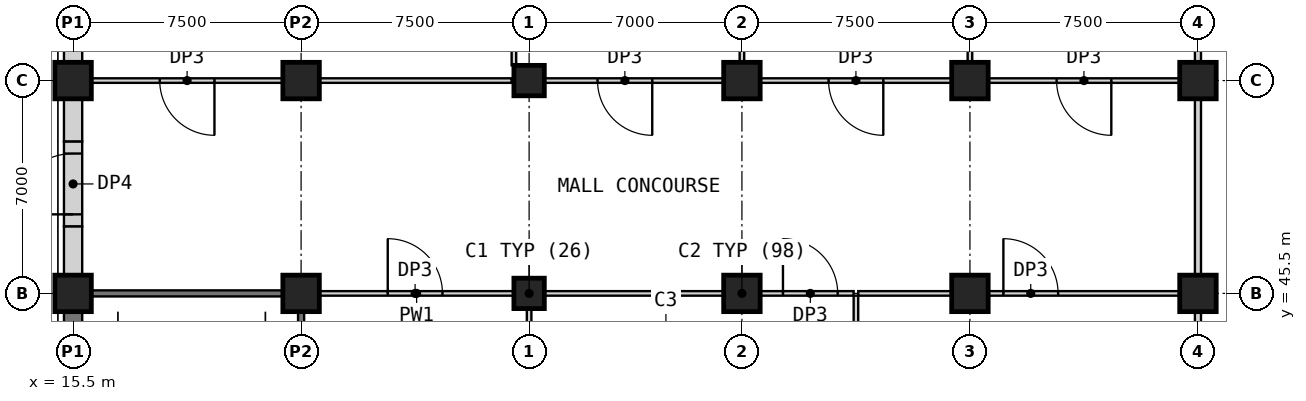
"""IFC4 building model, lengths in metres.
Left out: names, types, materials, properties, quantities, classifications, styles, units other than length and angle.
Written with IfcOpenShell. Run it as: python <this file> out.ifc"""

import sys

from ifc_helpers import new_model, si_unit, direction, frame, frame_2d, origin, origin_2d, place, context, subcontext, project, spatial, rectangle, extrude, element, fill, save


model = new_model("IFC4")
c1 = context("Model", 3, precision=1e-05, world=origin(), true_north=direction((0.0, 1.0)))
c2 = subcontext(c1, "Body", "Model", "MODEL_VIEW")
j1 = project(units=[si_unit("LENGTHUNIT", "METRE"), si_unit("PLANEANGLEUNIT", "RADIAN")], contexts=[c1])
p1 = place(None, origin())
s1 = spatial("IfcSite", under=j1, at=p1, CompositionType="ELEMENT")
p2 = place(p1, origin())
s2 = spatial("IfcBuilding", under=s1, at=p2, CompositionType="ELEMENT")
p3 = place(p2, origin())
s3 = spatial("IfcBuildingStorey", under=s2, at=p3, CompositionType="ELEMENT", Elevation=0.0)
for number, where, z_axis, x_axis in (
    (1, (30.5, 45.5, 0.0), (0.0, 0.0, 1.0), (1.0, 0.0, 0.0)),
    (2, (30.5, 52.5, 0.0), (0.0, 0.0, 1.0), (1.0, 0.0, 0.0)),
):
    element("IfcColumn", number, at=place(p3, frame(where, z_axis=z_axis, x_axis=x_axis)), inside=s3, PredefinedType="COLUMN", context=c2, shape_type="SweptSolid", body=[
        extrude(rectangle(XDim=1.0, YDim=1.0, at=origin_2d()), origin(), (0.0, 0.0, 1.0), 8.0),
    ])
for number, where, z_axis, x_axis in (
    (3, (37.5, 45.5, 0.0), (0.0, 0.0, 1.0), (1.0, 0.0, 0.0)),
    (4, (37.5, 52.5, 0.0), (0.0, 0.0, 1.0), (1.0, 0.0, 0.0)),
    (5, (45.0, 45.5, 0.0), (0.0, 0.0, 1.0), (1.0, 0.0, 0.0)),
    (6, (45.0, 52.5, 0.0), (0.0, 0.0, 1.0), (1.0, 0.0, 0.0)),
    (7, (52.5, 45.5, 0.0), (0.0, 0.0, 1.0), (1.0, 0.0, 0.0)),
    (8, (52.5, 52.5, 0.0), (0.0, 0.0, 1.0), (1.0, 0.0, 0.0)),
    (9, (15.5, 45.5, 0.0), (0.0, 0.0, 1.0), (1.0, 0.0, 0.0)),
    (10, (15.5, 52.5, 0.0), (0.0, 0.0, 1.0), (1.0, 0.0, 0.0)),
    (11, (23.0, 45.5, 0.0), (0.0, 0.0, 1.0), (1.0, 0.0, 0.0)),
    (12, (23.0, 52.5, 0.0), (0.0, 0.0, 1.0), (1.0, 0.0, 0.0)),
):
    element("IfcColumn", number, at=place(p3, frame(where, z_axis=z_axis, x_axis=x_axis)), inside=s3, PredefinedType="COLUMN", context=c2, shape_type="SweptSolid", body=[
        extrude(rectangle(XDim=1.2, YDim=1.2, at=origin_2d()), origin(), (0.0, 0.0, 1.0), 8.0),
    ])
p4 = place(p3, frame((16.1, 45.5, 0.0), z_axis=(0.0, 0.0, 1.0), x_axis=(1.0, 0.0, 0.0)))
e13 = element("IfcWall", 13, at=p4, inside=s3, PredefinedType="SHEAR", context=c2, shape_type="SweptSolid", body=[
    extrude(rectangle(XDim=6.3, YDim=0.2, at=frame_2d((3.15, 0.0))), origin(), (0.0, 0.0, 1.0), 7.7),
])
p5 = place(p3, frame((23.6, 45.5, 0.0), z_axis=(0.0, 0.0, 1.0), x_axis=(1.0, 0.0, 0.0)))
e14 = element("IfcWall", 14, at=p5, inside=s3, PredefinedType="PARTITIONING", context=c2, shape_type="SweptSolid", body=[
    extrude(rectangle(XDim=6.4, YDim=0.15, at=frame_2d((3.2, 0.0))), origin(), (0.0, 0.0, 1.0), 7.7),
])
p6 = place(p5, frame((2.25, 0.0, 0.0)))
e15 = element("IfcOpeningElement", 15, at=p6, cuts=e14, PredefinedType="OPENING", context=c2, shape_type="SweptSolid", body=[
    extrude(rectangle(XDim=1.8, YDim=2.4, at=frame_2d((0.9, 1.2))), frame((0.0, 0.085, 0.0), z_axis=(0.0, -1.0, 0.0), x_axis=(1.0, 0.0, 0.0)), (0.0, 0.0, 1.0), 0.17),
])
p7 = place(p3, frame((31.0, 45.5, 0.0), z_axis=(0.0, 0.0, 1.0), x_axis=(1.0, 0.0, 0.0)))
e16 = element("IfcWall", 16, at=p7, inside=s3, PredefinedType="PARTITIONING", context=c2, shape_type="SweptSolid", body=[
    extrude(rectangle(XDim=5.9, YDim=0.15, at=frame_2d((2.95, 0.0))), origin(), (0.0, 0.0, 1.0), 7.7),
])
p8 = place(p3, frame((38.1, 45.5, 0.0), z_axis=(0.0, 0.0, 1.0), x_axis=(1.0, 0.0, 0.0)))
e17 = element("IfcWall", 17, at=p8, inside=s3, PredefinedType="PARTITIONING", context=c2, shape_type="SweptSolid", body=[
    extrude(rectangle(XDim=3.075, YDim=0.15, at=frame_2d((1.538, 0.0))), origin(), (0.0, 0.0, 1.0), 7.7),
])
p9 = place(p8, frame((0.75, 0.0, 0.0)))
e18 = element("IfcOpeningElement", 18, at=p9, cuts=e17, PredefinedType="OPENING", context=c2, shape_type="SweptSolid", body=[
    extrude(rectangle(XDim=1.8, YDim=2.4, at=frame_2d((0.9, 1.2))), frame((0.0, 0.085, 0.0), z_axis=(0.0, -1.0, 0.0), x_axis=(1.0, 0.0, 0.0)), (0.0, 0.0, 1.0), 0.17),
])
p10 = place(p3, frame((41.325, 45.5, 0.0), z_axis=(0.0, 0.0, 1.0), x_axis=(1.0, 0.0, 0.0)))
e19 = element("IfcWall", 19, at=p10, inside=s3, PredefinedType="PARTITIONING", context=c2, shape_type="SweptSolid", body=[
    extrude(rectangle(XDim=3.075, YDim=0.15, at=frame_2d((1.538, 0.0))), origin(), (0.0, 0.0, 1.0), 7.7),
])
p11 = place(p3, frame((45.6, 45.5, 0.0), z_axis=(0.0, 0.0, 1.0), x_axis=(1.0, 0.0, 0.0)))
e20 = element("IfcWall", 20, at=p11, inside=s3, PredefinedType="PARTITIONING", context=c2, shape_type="SweptSolid", body=[
    extrude(rectangle(XDim=6.3, YDim=0.15, at=frame_2d((3.15, 0.0))), origin(), (0.0, 0.0, 1.0), 7.7),
])
p12 = place(p11, frame((0.5, 0.0, 0.0)))
e21 = element("IfcOpeningElement", 21, at=p12, cuts=e20, PredefinedType="OPENING", context=c2, shape_type="SweptSolid", body=[
    extrude(rectangle(XDim=1.8, YDim=2.4, at=frame_2d((0.9, 1.2))), frame((0.0, 0.085, 0.0), z_axis=(0.0, -1.0, 0.0), x_axis=(1.0, 0.0, 0.0)), (0.0, 0.0, 1.0), 0.17),
])
p13 = place(p3, frame((22.4, 52.5, 0.0), z_axis=(0.0, 0.0, 1.0), x_axis=(-1.0, 0.0, 0.0)))
e22 = element("IfcWall", 22, at=p13, inside=s3, PredefinedType="PARTITIONING", context=c2, shape_type="SweptSolid", body=[
    extrude(rectangle(XDim=6.3, YDim=0.15, at=frame_2d((3.15, 0.0))), origin(), (0.0, 0.0, 1.0), 7.7),
])
p14 = place(p13, frame((2.25, 0.0, 0.0)))
e23 = element("IfcOpeningElement", 23, at=p14, cuts=e22, PredefinedType="OPENING", context=c2, shape_type="SweptSolid", body=[
    extrude(rectangle(XDim=1.8, YDim=2.4, at=frame_2d((0.9, 1.2))), frame((0.0, 0.085, 0.0), z_axis=(0.0, -1.0, 0.0), x_axis=(1.0, 0.0, 0.0)), (0.0, 0.0, 1.0), 0.17),
])
p15 = place(p3, frame((23.6, 52.5, 0.0), z_axis=(0.0, 0.0, 1.0), x_axis=(1.0, 0.0, 0.0)))
e24 = element("IfcWall", 24, at=p15, inside=s3, PredefinedType="PARTITIONING", context=c2, shape_type="SweptSolid", body=[
    extrude(rectangle(XDim=6.325, YDim=0.15, at=frame_2d((3.163, 0.0))), origin(), (0.0, 0.0, 1.0), 7.7),
])
p16 = place(p3, frame((36.9, 52.5, 0.0), z_axis=(0.0, 0.0, 1.0), x_axis=(-1.0, 0.0, 0.0)))
e25 = element("IfcWall", 25, at=p16, inside=s3, PredefinedType="PARTITIONING", context=c2, shape_type="SweptSolid", body=[
    extrude(rectangle(XDim=5.9, YDim=0.15, at=frame_2d((2.95, 0.0))), origin(), (0.0, 0.0, 1.0), 7.7),
])
p17 = place(p16, frame((2.35, 0.0, 0.0)))
e26 = element("IfcOpeningElement", 26, at=p17, cuts=e25, PredefinedType="OPENING", context=c2, shape_type="SweptSolid", body=[
    extrude(rectangle(XDim=1.8, YDim=2.4, at=frame_2d((0.9, 1.2))), frame((0.0, 0.085, 0.0), z_axis=(0.0, -1.0, 0.0), x_axis=(1.0, 0.0, 0.0)), (0.0, 0.0, 1.0), 0.17),
])
p18 = place(p3, frame((44.4, 52.5, 0.0), z_axis=(0.0, 0.0, 1.0), x_axis=(-1.0, 0.0, 0.0)))
e27 = element("IfcWall", 27, at=p18, inside=s3, PredefinedType="PARTITIONING", context=c2, shape_type="SweptSolid", body=[
    extrude(rectangle(XDim=6.3, YDim=0.15, at=frame_2d((3.15, 0.0))), origin(), (0.0, 0.0, 1.0), 7.7),
])
p19 = place(p18, frame((2.25, 0.0, 0.0)))
e28 = element("IfcOpeningElement", 28, at=p19, cuts=e27, PredefinedType="OPENING", context=c2, shape_type="SweptSolid", body=[
    extrude(rectangle(XDim=1.8, YDim=2.4, at=frame_2d((0.9, 1.2))), frame((0.0, 0.085, 0.0), z_axis=(0.0, -1.0, 0.0), x_axis=(1.0, 0.0, 0.0)), (0.0, 0.0, 1.0), 0.17),
])
p20 = place(p3, frame((51.9, 52.5, 0.0), z_axis=(0.0, 0.0, 1.0), x_axis=(-1.0, 0.0, 0.0)))
e29 = element("IfcWall", 29, at=p20, inside=s3, PredefinedType="PARTITIONING", context=c2, shape_type="SweptSolid", body=[
    extrude(rectangle(XDim=6.3, YDim=0.15, at=frame_2d((3.15, 0.0))), origin(), (0.0, 0.0, 1.0), 7.7),
])
p21 = place(p20, frame((2.25, 0.0, 0.0)))
e30 = element("IfcOpeningElement", 30, at=p21, cuts=e29, PredefinedType="OPENING", context=c2, shape_type="SweptSolid", body=[
    extrude(rectangle(XDim=1.8, YDim=2.4, at=frame_2d((0.9, 1.2))), frame((0.0, 0.085, 0.0), z_axis=(0.0, -1.0, 0.0), x_axis=(1.0, 0.0, 0.0)), (0.0, 0.0, 1.0), 0.17),
])
p22 = place(p3, frame((15.5, 43.9, 0.0), z_axis=(0.0, 0.0, 1.0), x_axis=(0.0, 1.0, 0.0)))
e31 = element("IfcWall", 31, at=p22, inside=s3, PredefinedType="PARTITIONING", context=c2, shape_type="SweptSolid", body=[
    extrude(rectangle(XDim=1.0, YDim=0.6, at=frame_2d((0.5, 0.0))), origin(), (0.0, 0.0, 1.0), 7.1),
])
p23 = place(p3, frame((15.5, 47.7, 0.0), z_axis=(0.0, 0.0, 1.0), x_axis=(0.0, 1.0, 0.0)))
e32 = element("IfcWall", 32, at=p23, inside=s3, PredefinedType="PARTITIONING", context=c2, shape_type="SweptSolid", body=[
    extrude(rectangle(XDim=2.8, YDim=0.6, at=frame_2d((1.4, 0.0))), origin(), (0.0, 0.0, 1.0), 7.1),
])
p24 = place(p23, frame((0.4, 0.0, 0.0)))
e33 = element("IfcOpeningElement", 33, at=p24, cuts=e32, PredefinedType="OPENING", context=c2, shape_type="SweptSolid", body=[
    extrude(rectangle(XDim=2.0, YDim=2.4, at=frame_2d((1.0, 1.2))), frame((0.0, 0.31, 0.0), z_axis=(0.0, -1.0, 0.0), x_axis=(1.0, 0.0, 0.0)), (0.0, 0.0, 1.0), 0.62),
])
p25 = place(p3, frame((15.5, 46.1, 0.0), z_axis=(0.0, 0.0, 1.0), x_axis=(0.0, 1.0, 0.0)))
e34 = element("IfcWall", 34, at=p25, inside=s3, PredefinedType="PARTITIONING", context=c2, shape_type="SweptSolid", body=[
    extrude(rectangle(XDim=1.6, YDim=0.6, at=frame_2d((0.8, 0.0))), origin(), (0.0, 0.0, 1.0), 7.1),
])
p26 = place(p3, frame((15.5, 50.5, 0.0), z_axis=(0.0, 0.0, 1.0), x_axis=(0.0, 1.0, 0.0)))
e35 = element("IfcWall", 35, at=p26, inside=s3, PredefinedType="PARTITIONING", context=c2, shape_type="SweptSolid", body=[
    extrude(rectangle(XDim=1.4, YDim=0.6, at=frame_2d((0.7, 0.0))), origin(), (0.0, 0.0, 1.0), 7.1),
])
p27 = place(p3, frame((15.5, 53.1, 0.0), z_axis=(0.0, 0.0, 1.0), x_axis=(0.0, 1.0, 0.0)))
e36 = element("IfcWall", 36, at=p27, inside=s3, PredefinedType="PARTITIONING", context=c2, shape_type="SweptSolid", body=[
    extrude(rectangle(XDim=6.3, YDim=0.6, at=frame_2d((3.15, 0.0))), origin(), (0.0, 0.0, 1.0), 7.1),
])
p28 = place(p3, frame((23.0, 38.6, 0.0), z_axis=(0.0, 0.0, 1.0), x_axis=(0.0, 1.0, 0.0)))
e37 = element("IfcWall", 37, at=p28, inside=s3, PredefinedType="SHEAR", context=c2, shape_type="SweptSolid", body=[
    extrude(rectangle(XDim=6.3, YDim=0.2, at=frame_2d((3.15, 0.0))), origin(), (0.0, 0.0, 1.0), 7.7),
])
p29 = place(p3, frame((30.5, 38.6, 0.0), z_axis=(0.0, 0.0, 1.0), x_axis=(0.0, 1.0, 0.0)))
e38 = element("IfcWall", 38, at=p29, inside=s3, PredefinedType="PARTITIONING", context=c2, shape_type="SweptSolid", body=[
    extrude(rectangle(XDim=6.4, YDim=0.15, at=frame_2d((3.2, 0.0))), origin(), (0.0, 0.0, 1.0), 7.7),
])
p30 = place(p3, frame((41.25, 30.58, 0.0), z_axis=(0.0, 0.0, 1.0), x_axis=(0.0, 1.0, 0.0)))
e39 = element("IfcWall", 39, at=p30, inside=s3, PredefinedType="PARTITIONING", context=c2, shape_type="SweptSolid", body=[
    extrude(rectangle(XDim=14.845, YDim=0.15, at=frame_2d((7.422, 0.0))), origin(), (0.0, 0.0, 1.0), 7.1),
])
p31 = place(p3, frame((52.5, 38.5, 0.0), z_axis=(0.0, 0.0, 1.0), x_axis=(0.0, 1.0, 0.0)))
e40 = element("IfcWall", 40, at=p31, inside=s3, PredefinedType="PARTITIONING", context=c2, shape_type="SweptSolid", body=[
    extrude(rectangle(XDim=6.4, YDim=0.2, at=frame_2d((3.2, 0.0))), origin(), (0.0, 0.0, 1.0), 7.7),
])
p32 = place(p3, frame((52.5, 46.1, 0.0), z_axis=(0.0, 0.0, 1.0), x_axis=(0.0, 1.0, 0.0)))
e41 = element("IfcWall", 41, at=p32, inside=s3, PredefinedType="PARTITIONING", context=c2, shape_type="SweptSolid", body=[
    extrude(rectangle(XDim=5.8, YDim=0.2, at=frame_2d((2.9, 0.0))), origin(), (0.0, 0.0, 1.0), 7.7),
])
p33 = place(p3, frame((52.5, 53.1, 0.0), z_axis=(0.0, 0.0, 1.0), x_axis=(0.0, 1.0, 0.0)))
e42 = element("IfcWall", 42, at=p33, inside=s3, PredefinedType="PARTITIONING", context=c2, shape_type="SweptSolid", body=[
    extrude(rectangle(XDim=6.0, YDim=0.2, at=frame_2d((3.0, 0.0))), origin(), (0.0, 0.0, 1.0), 7.7),
])
p34 = place(p3, frame((30.0, 53.0, 0.0), z_axis=(0.0, 0.0, 1.0), x_axis=(0.0, 1.0, 0.0)))
e43 = element("IfcWall", 43, at=p34, inside=s3, PredefinedType="PARTITIONING", context=c2, shape_type="SweptSolid", body=[
    extrude(rectangle(XDim=6.925, YDim=0.15, at=frame_2d((3.462, 0.0))), origin(), (0.0, 0.0, 1.0), 7.7),
])
for number, where, z_axis, x_axis in (
    (44, (37.5, 53.1, 0.0), (0.0, 0.0, 1.0), (0.0, 1.0, 0.0)),
    (45, (45.0, 53.1, 0.0), (0.0, 0.0, 1.0), (0.0, 1.0, 0.0)),
):
    element("IfcWall", number, at=place(p3, frame(where, z_axis=z_axis, x_axis=x_axis)), inside=s3, PredefinedType="PARTITIONING", context=c2, shape_type="SweptSolid", body=[
        extrude(rectangle(XDim=6.825, YDim=0.15, at=frame_2d((3.413, 0.0))), origin(), (0.0, 0.0, 1.0), 7.7),
    ])
p35 = place(p6, origin())
e46 = element("IfcDoor", 46, at=p35, inside=s3, OperationType="SINGLE_SWING_LEFT", PredefinedType="DOOR", context=c2, shape_type="SweptSolid", body=[
    extrude(rectangle(XDim=1.8, YDim=2.4, at=frame_2d((0.9, 1.2))), frame((0.0, 0.025, 0.0), z_axis=(0.0, -1.0, 0.0), x_axis=(1.0, 0.0, 0.0)), (0.0, 0.0, 1.0), 0.05),
])
fill(e15, e46)
p36 = place(p9, origin())
e47 = element("IfcDoor", 47, at=p36, inside=s3, OperationType="SINGLE_SWING_LEFT", PredefinedType="DOOR", context=c2, shape_type="SweptSolid", body=[
    extrude(rectangle(XDim=1.8, YDim=2.4, at=frame_2d((0.9, 1.2))), frame((0.0, 0.025, 0.0), z_axis=(0.0, -1.0, 0.0), x_axis=(1.0, 0.0, 0.0)), (0.0, 0.0, 1.0), 0.05),
])
fill(e18, e47)
p37 = place(p12, origin())
e48 = element("IfcDoor", 48, at=p37, inside=s3, OperationType="SINGLE_SWING_LEFT", PredefinedType="DOOR", context=c2, shape_type="SweptSolid", body=[
    extrude(rectangle(XDim=1.8, YDim=2.4, at=frame_2d((0.9, 1.2))), frame((0.0, 0.025, 0.0), z_axis=(0.0, -1.0, 0.0), x_axis=(1.0, 0.0, 0.0)), (0.0, 0.0, 1.0), 0.05),
])
fill(e21, e48)
p38 = place(p14, origin())
e49 = element("IfcDoor", 49, at=p38, inside=s3, OperationType="SINGLE_SWING_LEFT", PredefinedType="DOOR", context=c2, shape_type="SweptSolid", body=[
    extrude(rectangle(XDim=1.8, YDim=2.4, at=frame_2d((0.9, 1.2))), frame((0.0, 0.025, 0.0), z_axis=(0.0, -1.0, 0.0), x_axis=(1.0, 0.0, 0.0)), (0.0, 0.0, 1.0), 0.05),
])
fill(e23, e49)
p39 = place(p17, origin())
e50 = element("IfcDoor", 50, at=p39, inside=s3, OperationType="SINGLE_SWING_LEFT", PredefinedType="DOOR", context=c2, shape_type="SweptSolid", body=[
    extrude(rectangle(XDim=1.8, YDim=2.4, at=frame_2d((0.9, 1.2))), frame((0.0, 0.025, 0.0), z_axis=(0.0, -1.0, 0.0), x_axis=(1.0, 0.0, 0.0)), (0.0, 0.0, 1.0), 0.05),
])
fill(e26, e50)
p40 = place(p19, origin())
e51 = element("IfcDoor", 51, at=p40, inside=s3, OperationType="SINGLE_SWING_LEFT", PredefinedType="DOOR", context=c2, shape_type="SweptSolid", body=[
    extrude(rectangle(XDim=1.8, YDim=2.4, at=frame_2d((0.9, 1.2))), frame((0.0, 0.025, 0.0), z_axis=(0.0, -1.0, 0.0), x_axis=(1.0, 0.0, 0.0)), (0.0, 0.0, 1.0), 0.05),
])
fill(e28, e51)
p41 = place(p21, origin())
e52 = element("IfcDoor", 52, at=p41, inside=s3, OperationType="SINGLE_SWING_LEFT", PredefinedType="DOOR", context=c2, shape_type="SweptSolid", body=[
    extrude(rectangle(XDim=1.8, YDim=2.4, at=frame_2d((0.9, 1.2))), frame((0.0, 0.025, 0.0), z_axis=(0.0, -1.0, 0.0), x_axis=(1.0, 0.0, 0.0)), (0.0, 0.0, 1.0), 0.05),
])
fill(e30, e52)
p42 = place(p24, origin())
e53 = element("IfcDoor", 53, at=p42, inside=s3, OperationType="SINGLE_SWING_LEFT", PredefinedType="DOOR", context=c2, shape_type="SweptSolid", body=[
    extrude(rectangle(XDim=2.0, YDim=2.4, at=frame_2d((1.0, 1.2))), frame((0.0, 0.025, 0.0), z_axis=(0.0, -1.0, 0.0), x_axis=(1.0, 0.0, 0.0)), (0.0, 0.0, 1.0), 0.05),
])
fill(e33, e53)
save(model, sys.argv[1])
